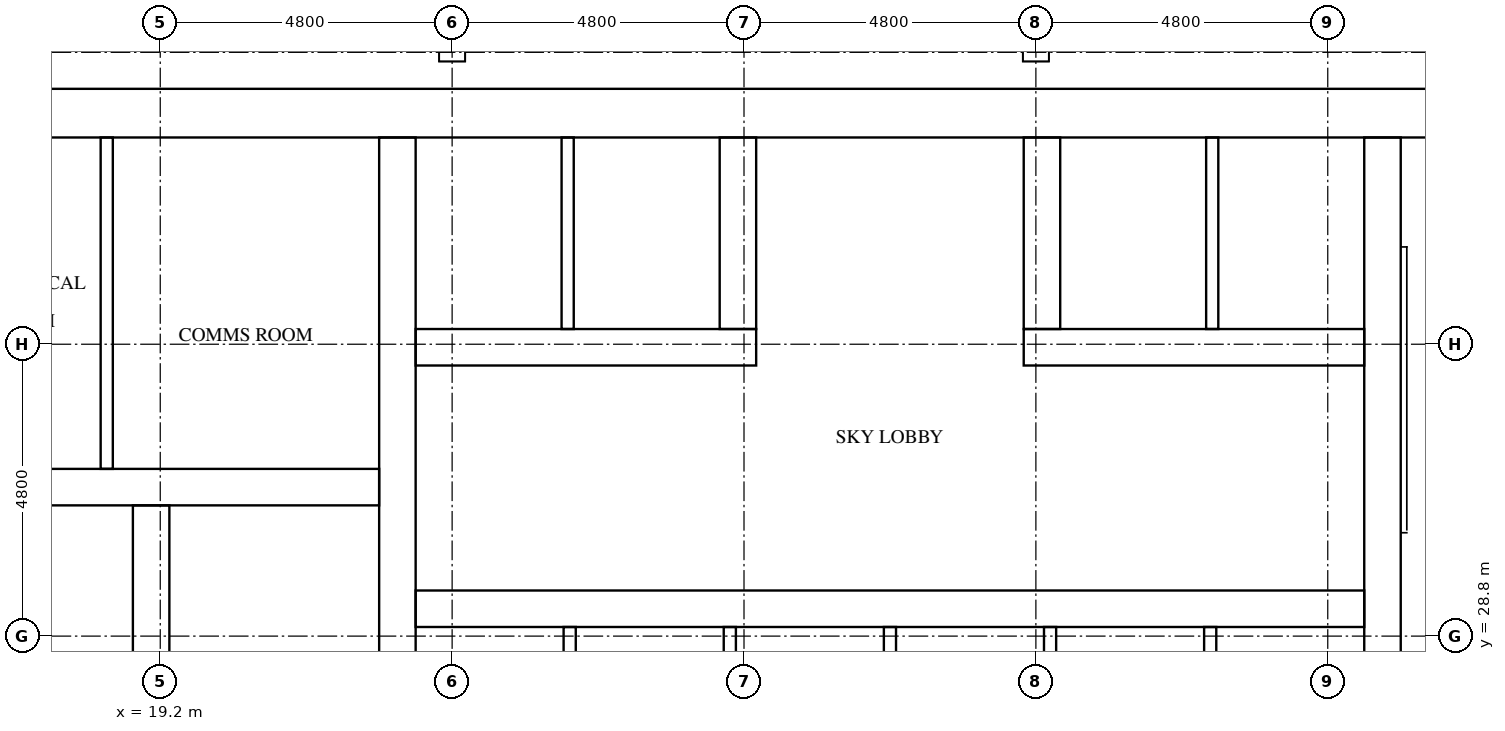
"""IFC4 building model, lengths in metres.
Left out: names, types, materials, properties, quantities, classifications, styles, units other than length and angle.
Written with IfcOpenShell. Run it as: python <this file> out.ifc"""

import sys

from ifc_helpers import new_model, si_unit, direction, frame, frame_2d, origin, place, context, subcontext, project, spatial, rectangle, extrude, element, fill, save


model = new_model("IFC4")
c1 = context("Model", 3, precision=1e-05, world=origin(), true_north=direction((0.0, 1.0)))
c2 = subcontext(c1, "Body", "Model", "MODEL_VIEW")
j1 = project(units=[si_unit("LENGTHUNIT", "METRE"), si_unit("PLANEANGLEUNIT", "RADIAN")], contexts=[c1])
p1 = place(None, origin())
s1 = spatial("IfcSite", under=j1, at=p1, CompositionType="ELEMENT")
p2 = place(p1, origin())
s2 = spatial("IfcBuilding", under=s1, at=p2, CompositionType="ELEMENT")
p3 = place(p2, frame((0.0, 0.0, 143.6)))
s3 = spatial("IfcBuildingStorey", under=s2, at=p3, CompositionType="ELEMENT", Elevation=143.6)
p4 = place(p3, frame((15.0, 37.4, 0.0), z_axis=(0.0, 0.0, 1.0), x_axis=(1.0, 0.0, 0.0)))
e1 = element("IfcWall", 1, at=p4, inside=s3, PredefinedType="SHEAR", context=c2, shape_type="SweptSolid", body=[
    extrude(rectangle(XDim=32.4, YDim=0.8, at=frame_2d((16.2, 0.0))), origin(), (0.0, 0.0, 1.0), 5.1),
])
p5 = place(p4, frame((15.3, 0.0, 0.0)))
e2 = element("IfcOpeningElement", 2, at=p5, cuts=e1, PredefinedType="OPENING", context=c2, shape_type="SweptSolid", body=[
    extrude(rectangle(XDim=1.8, YDim=2.1, at=frame_2d((0.9, 1.05))), frame((0.0, 0.41, 0.0), z_axis=(0.0, -1.0, 0.0), x_axis=(1.0, 0.0, 0.0)), (0.0, 0.0, 1.0), 0.82),
])
p6 = place(p4, frame((1.51, 0.0, 0.0)))
e3 = element("IfcOpeningElement", 3, at=p6, cuts=e1, PredefinedType="OPENING", context=c2, shape_type="SweptSolid", body=[
    extrude(rectangle(XDim=1.0, YDim=2.1, at=frame_2d((0.5, 1.05))), frame((0.0, 0.41, 0.0), z_axis=(0.0, -1.0, 0.0), x_axis=(1.0, 0.0, 0.0)), (0.0, 0.0, 1.0), 0.82),
])
p7 = place(p4, frame((5.11, 0.0, 0.0)))
e4 = element("IfcOpeningElement", 4, at=p7, cuts=e1, PredefinedType="OPENING", context=c2, shape_type="SweptSolid", body=[
    extrude(rectangle(XDim=1.0, YDim=2.1, at=frame_2d((0.5, 1.05))), frame((0.0, 0.41, 0.0), z_axis=(0.0, -1.0, 0.0), x_axis=(1.0, 0.0, 0.0)), (0.0, 0.0, 1.0), 0.82),
])
p8 = place(p3, frame((19.05, 15.8, 0.0), z_axis=(0.0, 0.0, 1.0), x_axis=(0.0, 1.0, 0.0)))
e5 = element("IfcWall", 5, at=p8, inside=s3, PredefinedType="SHEAR", context=c2, shape_type="SweptSolid", body=[
    extrude(rectangle(XDim=15.15, YDim=0.6, at=frame_2d((7.575, 0.0))), origin(), (0.0, 0.0, 1.0), 5.1),
])
p9 = place(p8, frame((9.65, 0.0, 0.0)))
e6 = element("IfcOpeningElement", 6, at=p9, cuts=e5, PredefinedType="OPENING", context=c2, shape_type="SweptSolid", body=[
    extrude(rectangle(XDim=1.1, YDim=2.1, at=frame_2d((0.55, 1.05))), frame((0.0, 0.31, 0.0), z_axis=(0.0, -1.0, 0.0), x_axis=(1.0, 0.0, 0.0)), (0.0, 0.0, 1.0), 0.62),
])
p10 = place(p8, frame((13.15, 0.0, 0.0)))
e7 = element("IfcOpeningElement", 7, at=p10, cuts=e5, PredefinedType="OPENING", context=c2, shape_type="SweptSolid", body=[
    extrude(rectangle(XDim=1.1, YDim=2.1, at=frame_2d((0.55, 1.05))), frame((0.0, 0.31, 0.0), z_axis=(0.0, -1.0, 0.0), x_axis=(1.0, 0.0, 0.0)), (0.0, 0.0, 1.0), 0.62),
])
p11 = place(p8, frame((0.4, 0.0, 0.0)))
e8 = element("IfcOpeningElement", 8, at=p11, cuts=e5, PredefinedType="OPENING", context=c2, shape_type="SweptSolid", body=[
    extrude(rectangle(XDim=1.2, YDim=2.1, at=frame_2d((0.6, 1.05))), frame((0.0, 0.31, 0.0), z_axis=(0.0, -1.0, 0.0), x_axis=(1.0, 0.0, 0.0)), (0.0, 0.0, 1.0), 0.62),
])
p12 = place(p3, frame((23.1, 15.8, 0.0), z_axis=(0.0, 0.0, 1.0), x_axis=(0.0, 1.0, 0.0)))
e9 = element("IfcWall", 9, at=p12, inside=s3, PredefinedType="SHEAR", context=c2, shape_type="SweptSolid", body=[
    extrude(rectangle(XDim=21.2, YDim=0.6, at=frame_2d((10.6, 0.0))), origin(), (0.0, 0.0, 1.0), 5.1),
])
p13 = place(p3, frame((39.3, 27.75, 0.0), z_axis=(0.0, 0.0, 1.0), x_axis=(0.0, 1.0, 0.0)))
e10 = element("IfcWall", 10, at=p13, inside=s3, PredefinedType="SHEAR", context=c2, shape_type="SweptSolid", body=[
    extrude(rectangle(XDim=9.25, YDim=0.6, at=frame_2d((4.625, 0.0))), origin(), (0.0, 0.0, 1.0), 5.1),
])
p14 = place(p3, frame((15.8, 31.25, 0.0), z_axis=(0.0, 0.0, 1.0), x_axis=(1.0, 0.0, 0.0)))
e11 = element("IfcWall", 11, at=p14, inside=s3, PredefinedType="SHEAR", context=c2, shape_type="SweptSolid", body=[
    extrude(rectangle(XDim=7.0, YDim=0.6, at=frame_2d((3.5, 0.0))), origin(), (0.0, 0.0, 1.0), 5.1),
])
p15 = place(p3, frame((23.4, 29.25, 0.0), z_axis=(0.0, 0.0, 1.0), x_axis=(1.0, 0.0, 0.0)))
e12 = element("IfcWall", 12, at=p15, inside=s3, PredefinedType="SHEAR", context=c2, shape_type="SweptSolid", body=[
    extrude(rectangle(XDim=15.6, YDim=0.6, at=frame_2d((7.8, 0.0))), origin(), (0.0, 0.0, 1.0), 5.1),
])
p16 = place(p15, frame((0.667, 0.0, 0.0)))
e13 = element("IfcOpeningElement", 13, at=p16, cuts=e12, PredefinedType="OPENING", context=c2, shape_type="SweptSolid", body=[
    extrude(rectangle(XDim=1.1, YDim=2.1, at=frame_2d((0.55, 1.05))), frame((0.0, 0.31, 0.0), z_axis=(0.0, -1.0, 0.0), x_axis=(1.0, 0.0, 0.0)), (0.0, 0.0, 1.0), 0.62),
])
p17 = place(p15, frame((3.3, 0.0, 0.0)))
e14 = element("IfcOpeningElement", 14, at=p17, cuts=e12, PredefinedType="OPENING", context=c2, shape_type="SweptSolid", body=[
    extrude(rectangle(XDim=1.1, YDim=2.1, at=frame_2d((0.55, 1.05))), frame((0.0, 0.31, 0.0), z_axis=(0.0, -1.0, 0.0), x_axis=(1.0, 0.0, 0.0)), (0.0, 0.0, 1.0), 0.62),
])
p18 = place(p15, frame((5.933, 0.0, 0.0)))
e15 = element("IfcOpeningElement", 15, at=p18, cuts=e12, PredefinedType="OPENING", context=c2, shape_type="SweptSolid", body=[
    extrude(rectangle(XDim=1.1, YDim=2.1, at=frame_2d((0.55, 1.05))), frame((0.0, 0.31, 0.0), z_axis=(0.0, -1.0, 0.0), x_axis=(1.0, 0.0, 0.0)), (0.0, 0.0, 1.0), 0.62),
])
p19 = place(p15, frame((8.567, 0.0, 0.0)))
e16 = element("IfcOpeningElement", 16, at=p19, cuts=e12, PredefinedType="OPENING", context=c2, shape_type="SweptSolid", body=[
    extrude(rectangle(XDim=1.1, YDim=2.1, at=frame_2d((0.55, 1.05))), frame((0.0, 0.31, 0.0), z_axis=(0.0, -1.0, 0.0), x_axis=(1.0, 0.0, 0.0)), (0.0, 0.0, 1.0), 0.62),
])
p20 = place(p15, frame((11.2, 0.0, 0.0)))
e17 = element("IfcOpeningElement", 17, at=p20, cuts=e12, PredefinedType="OPENING", context=c2, shape_type="SweptSolid", body=[
    extrude(rectangle(XDim=1.1, YDim=2.1, at=frame_2d((0.55, 1.05))), frame((0.0, 0.31, 0.0), z_axis=(0.0, -1.0, 0.0), x_axis=(1.0, 0.0, 0.0)), (0.0, 0.0, 1.0), 0.62),
])
p21 = place(p15, frame((13.833, 0.0, 0.0)))
e18 = element("IfcOpeningElement", 18, at=p21, cuts=e12, PredefinedType="OPENING", context=c2, shape_type="SweptSolid", body=[
    extrude(rectangle(XDim=1.1, YDim=2.1, at=frame_2d((0.55, 1.05))), frame((0.0, 0.31, 0.0), z_axis=(0.0, -1.0, 0.0), x_axis=(1.0, 0.0, 0.0)), (0.0, 0.0, 1.0), 0.62),
])
p22 = place(p3, frame((23.4, 33.55, 0.0), z_axis=(0.0, 0.0, 1.0), x_axis=(1.0, 0.0, 0.0)))
e19 = element("IfcWall", 19, at=p22, inside=s3, PredefinedType="SHEAR", context=c2, shape_type="SweptSolid", body=[
    extrude(rectangle(XDim=5.6, YDim=0.6, at=frame_2d((2.8, 0.0))), origin(), (0.0, 0.0, 1.0), 5.1),
])
p23 = place(p22, frame((0.65, 0.0, 0.0)))
e20 = element("IfcOpeningElement", 20, at=p23, cuts=e19, PredefinedType="OPENING", context=c2, shape_type="SweptSolid", body=[
    extrude(rectangle(XDim=1.1, YDim=2.1, at=frame_2d((0.55, 1.05))), frame((0.0, 0.31, 0.0), z_axis=(0.0, -1.0, 0.0), x_axis=(1.0, 0.0, 0.0)), (0.0, 0.0, 1.0), 0.62),
])
p24 = place(p22, frame((3.25, 0.0, 0.0)))
e21 = element("IfcOpeningElement", 21, at=p24, cuts=e19, PredefinedType="OPENING", context=c2, shape_type="SweptSolid", body=[
    extrude(rectangle(XDim=1.1, YDim=2.1, at=frame_2d((0.55, 1.05))), frame((0.0, 0.31, 0.0), z_axis=(0.0, -1.0, 0.0), x_axis=(1.0, 0.0, 0.0)), (0.0, 0.0, 1.0), 0.62),
])
p25 = place(p3, frame((33.4, 33.55, 0.0), z_axis=(0.0, 0.0, 1.0), x_axis=(1.0, 0.0, 0.0)))
e22 = element("IfcWall", 22, at=p25, inside=s3, PredefinedType="SHEAR", context=c2, shape_type="SweptSolid", body=[
    extrude(rectangle(XDim=5.6, YDim=0.6, at=frame_2d((2.8, 0.0))), origin(), (0.0, 0.0, 1.0), 5.1),
])
p26 = place(p25, frame((1.25, 0.0, 0.0)))
e23 = element("IfcOpeningElement", 23, at=p26, cuts=e22, PredefinedType="OPENING", context=c2, shape_type="SweptSolid", body=[
    extrude(rectangle(XDim=1.1, YDim=2.1, at=frame_2d((0.55, 1.05))), frame((0.0, 0.31, 0.0), z_axis=(0.0, -1.0, 0.0), x_axis=(1.0, 0.0, 0.0)), (0.0, 0.0, 1.0), 0.62),
])
p27 = place(p25, frame((3.85, 0.0, 0.0)))
e24 = element("IfcOpeningElement", 24, at=p27, cuts=e22, PredefinedType="OPENING", context=c2, shape_type="SweptSolid", body=[
    extrude(rectangle(XDim=1.1, YDim=2.1, at=frame_2d((0.55, 1.05))), frame((0.0, 0.31, 0.0), z_axis=(0.0, -1.0, 0.0), x_axis=(1.0, 0.0, 0.0)), (0.0, 0.0, 1.0), 0.62),
])
for number, where, z_axis, x_axis in (
    (25, (28.7, 33.85, 0.0), (0.0, 0.0, 1.0), (0.0, 1.0, 0.0)),
    (26, (33.7, 33.85, 0.0), (0.0, 0.0, 1.0), (0.0, 1.0, 0.0)),
):
    element("IfcWall", number, at=place(p3, frame(where, z_axis=z_axis, x_axis=x_axis)), inside=s3, PredefinedType="SHEAR", context=c2, shape_type="SweptSolid", body=[
        extrude(rectangle(XDim=3.15, YDim=0.6, at=frame_2d((1.575, 0.0))), origin(), (0.0, 0.0, 1.0), 5.1),
    ])
for number, where, z_axis, x_axis in (
    (27, (25.933, 26.45, 0.0), (0.0, 0.0, 1.0), (0.0, 1.0, 0.0)),
    (28, (28.567, 26.45, 0.0), (0.0, 0.0, 1.0), (0.0, 1.0, 0.0)),
    (29, (31.2, 26.45, 0.0), (0.0, 0.0, 1.0), (0.0, 1.0, 0.0)),
    (30, (33.833, 26.45, 0.0), (0.0, 0.0, 1.0), (0.0, 1.0, 0.0)),
    (31, (36.467, 26.45, 0.0), (0.0, 0.0, 1.0), (0.0, 1.0, 0.0)),
):
    element("IfcWall", number, at=place(p3, frame(where, z_axis=z_axis, x_axis=x_axis)), inside=s3, PredefinedType="SOLIDWALL", context=c2, shape_type="SweptSolid", body=[
        extrude(rectangle(XDim=2.5, YDim=0.2, at=frame_2d((1.25, 0.0))), origin(), (0.0, 0.0, 1.0), 5.1),
    ])
for number, where, z_axis, x_axis in (
    (32, (25.9, 33.85, 0.0), (0.0, 0.0, 1.0), (0.0, 1.0, 0.0)),
    (33, (36.5, 33.85, 0.0), (0.0, 0.0, 1.0), (0.0, 1.0, 0.0)),
):
    element("IfcWall", number, at=place(p3, frame(where, z_axis=z_axis, x_axis=x_axis)), inside=s3, PredefinedType="SOLIDWALL", context=c2, shape_type="SweptSolid", body=[
        extrude(rectangle(XDim=3.15, YDim=0.2, at=frame_2d((1.575, 0.0))), origin(), (0.0, 0.0, 1.0), 5.1),
    ])
p28 = place(p3, frame((18.32, 31.55, 0.0), z_axis=(0.0, 0.0, 1.0), x_axis=(0.0, 1.0, 0.0)))
e34 = element("IfcWall", 34, at=p28, inside=s3, PredefinedType="PARTITIONING", context=c2, shape_type="SweptSolid", body=[
    extrude(rectangle(XDim=5.45, YDim=0.2, at=frame_2d((2.725, 0.0))), origin(), (0.0, 0.0, 1.0), 5.1),
])
p29 = place(p23, origin())
e35 = element("IfcDoor", 35, at=p29, inside=s3, OperationType="DOUBLE_DOOR_SLIDING", PredefinedType="DOOR", context=c2, shape_type="SweptSolid", body=[
    extrude(rectangle(XDim=1.1, YDim=2.1, at=frame_2d((0.55, 1.05))), frame((0.0, 0.025, 0.0), z_axis=(0.0, -1.0, 0.0), x_axis=(1.0, 0.0, 0.0)), (0.0, 0.0, 1.0), 0.05),
])
fill(e20, e35)
p30 = place(p24, origin())
e36 = element("IfcDoor", 36, at=p30, inside=s3, OperationType="DOUBLE_DOOR_SLIDING", PredefinedType="DOOR", context=c2, shape_type="SweptSolid", body=[
    extrude(rectangle(XDim=1.1, YDim=2.1, at=frame_2d((0.55, 1.05))), frame((0.0, 0.025, 0.0), z_axis=(0.0, -1.0, 0.0), x_axis=(1.0, 0.0, 0.0)), (0.0, 0.0, 1.0), 0.05),
])
fill(e21, e36)
p31 = place(p26, origin())
e37 = element("IfcDoor", 37, at=p31, inside=s3, OperationType="DOUBLE_DOOR_SLIDING", PredefinedType="DOOR", context=c2, shape_type="SweptSolid", body=[
    extrude(rectangle(XDim=1.1, YDim=2.1, at=frame_2d((0.55, 1.05))), frame((0.0, 0.025, 0.0), z_axis=(0.0, -1.0, 0.0), x_axis=(1.0, 0.0, 0.0)), (0.0, 0.0, 1.0), 0.05),
])
fill(e23, e37)
p32 = place(p27, origin())
e38 = element("IfcDoor", 38, at=p32, inside=s3, OperationType="DOUBLE_DOOR_SLIDING", PredefinedType="DOOR", context=c2, shape_type="SweptSolid", body=[
    extrude(rectangle(XDim=1.1, YDim=2.1, at=frame_2d((0.55, 1.05))), frame((0.0, 0.025, 0.0), z_axis=(0.0, -1.0, 0.0), x_axis=(1.0, 0.0, 0.0)), (0.0, 0.0, 1.0), 0.05),
])
fill(e24, e38)
p33 = place(p16, origin())
e39 = element("IfcDoor", 39, at=p33, inside=s3, OperationType="DOUBLE_DOOR_SLIDING", PredefinedType="DOOR", context=c2, shape_type="SweptSolid", body=[
    extrude(rectangle(XDim=1.1, YDim=2.1, at=frame_2d((0.55, 1.05))), frame((0.0, 0.025, 0.0), z_axis=(0.0, -1.0, 0.0), x_axis=(1.0, 0.0, 0.0)), (0.0, 0.0, 1.0), 0.05),
])
fill(e13, e39)
p34 = place(p17, origin())
e40 = element("IfcDoor", 40, at=p34, inside=s3, OperationType="DOUBLE_DOOR_SLIDING", PredefinedType="DOOR", context=c2, shape_type="SweptSolid", body=[
    extrude(rectangle(XDim=1.1, YDim=2.1, at=frame_2d((0.55, 1.05))), frame((0.0, 0.025, 0.0), z_axis=(0.0, -1.0, 0.0), x_axis=(1.0, 0.0, 0.0)), (0.0, 0.0, 1.0), 0.05),
])
fill(e14, e40)
p35 = place(p18, origin())
e41 = element("IfcDoor", 41, at=p35, inside=s3, OperationType="DOUBLE_DOOR_SLIDING", PredefinedType="DOOR", context=c2, shape_type="SweptSolid", body=[
    extrude(rectangle(XDim=1.1, YDim=2.1, at=frame_2d((0.55, 1.05))), frame((0.0, 0.025, 0.0), z_axis=(0.0, -1.0, 0.0), x_axis=(1.0, 0.0, 0.0)), (0.0, 0.0, 1.0), 0.05),
])
fill(e15, e41)
p36 = place(p19, origin())
e42 = element("IfcDoor", 42, at=p36, inside=s3, OperationType="DOUBLE_DOOR_SLIDING", PredefinedType="DOOR", context=c2, shape_type="SweptSolid", body=[
    extrude(rectangle(XDim=1.1, YDim=2.1, at=frame_2d((0.55, 1.05))), frame((0.0, 0.025, 0.0), z_axis=(0.0, -1.0, 0.0), x_axis=(1.0, 0.0, 0.0)), (0.0, 0.0, 1.0), 0.05),
])
fill(e16, e42)
p37 = place(p20, origin())
e43 = element("IfcDoor", 43, at=p37, inside=s3, OperationType="DOUBLE_DOOR_SLIDING", PredefinedType="DOOR", context=c2, shape_type="SweptSolid", body=[
    extrude(rectangle(XDim=1.1, YDim=2.1, at=frame_2d((0.55, 1.05))), frame((0.0, 0.025, 0.0), z_axis=(0.0, -1.0, 0.0), x_axis=(1.0, 0.0, 0.0)), (0.0, 0.0, 1.0), 0.05),
])
fill(e17, e43)
p38 = place(p21, origin())
e44 = element("IfcDoor", 44, at=p38, inside=s3, OperationType="DOUBLE_DOOR_SLIDING", PredefinedType="DOOR", context=c2, shape_type="SweptSolid", body=[
    extrude(rectangle(XDim=1.1, YDim=2.1, at=frame_2d((0.55, 1.05))), frame((0.0, 0.025, 0.0), z_axis=(0.0, -1.0, 0.0), x_axis=(1.0, 0.0, 0.0)), (0.0, 0.0, 1.0), 0.05),
])
fill(e18, e44)
p39 = place(p10, origin())
e45 = element("IfcDoor", 45, at=p39, inside=s3, OperationType="DOUBLE_DOOR_SLIDING", PredefinedType="DOOR", context=c2, shape_type="SweptSolid", body=[
    extrude(rectangle(XDim=1.1, YDim=2.1, at=frame_2d((0.55, 1.05))), frame((0.0, 0.025, 0.0), z_axis=(0.0, -1.0, 0.0), x_axis=(1.0, 0.0, 0.0)), (0.0, 0.0, 1.0), 0.05),
])
fill(e7, e45)
p40 = place(p5, origin())
e46 = element("IfcDoor", 46, at=p40, inside=s3, OperationType="DOUBLE_DOOR_SINGLE_SWING", PredefinedType="DOOR", context=c2, shape_type="SweptSolid", body=[
    extrude(rectangle(XDim=1.8, YDim=2.1, at=frame_2d((0.9, 1.05))), frame((0.0, 0.025, 0.0), z_axis=(0.0, -1.0, 0.0), x_axis=(1.0, 0.0, 0.0)), (0.0, 0.0, 1.0), 0.05),
])
fill(e2, e46)
p41 = place(p6, origin())
e47 = element("IfcDoor", 47, at=p41, inside=s3, OperationType="SINGLE_SWING_RIGHT", PredefinedType="DOOR", context=c2, shape_type="SweptSolid", body=[
    extrude(rectangle(XDim=1.0, YDim=2.1, at=frame_2d((0.5, 1.05))), frame((0.0, 0.025, 0.0), z_axis=(0.0, -1.0, 0.0), x_axis=(1.0, 0.0, 0.0)), (0.0, 0.0, 1.0), 0.05),
])
fill(e3, e47)
p42 = place(p7, origin())
e48 = element("IfcDoor", 48, at=p42, inside=s3, OperationType="SINGLE_SWING_LEFT", PredefinedType="DOOR", context=c2, shape_type="SweptSolid", body=[
    extrude(rectangle(XDim=1.0, YDim=2.1, at=frame_2d((0.5, 1.05))), frame((0.0, 0.025, 0.0), z_axis=(0.0, -1.0, 0.0), x_axis=(1.0, 0.0, 0.0)), (0.0, 0.0, 1.0), 0.05),
])
fill(e4, e48)
save(model, sys.argv[1])
